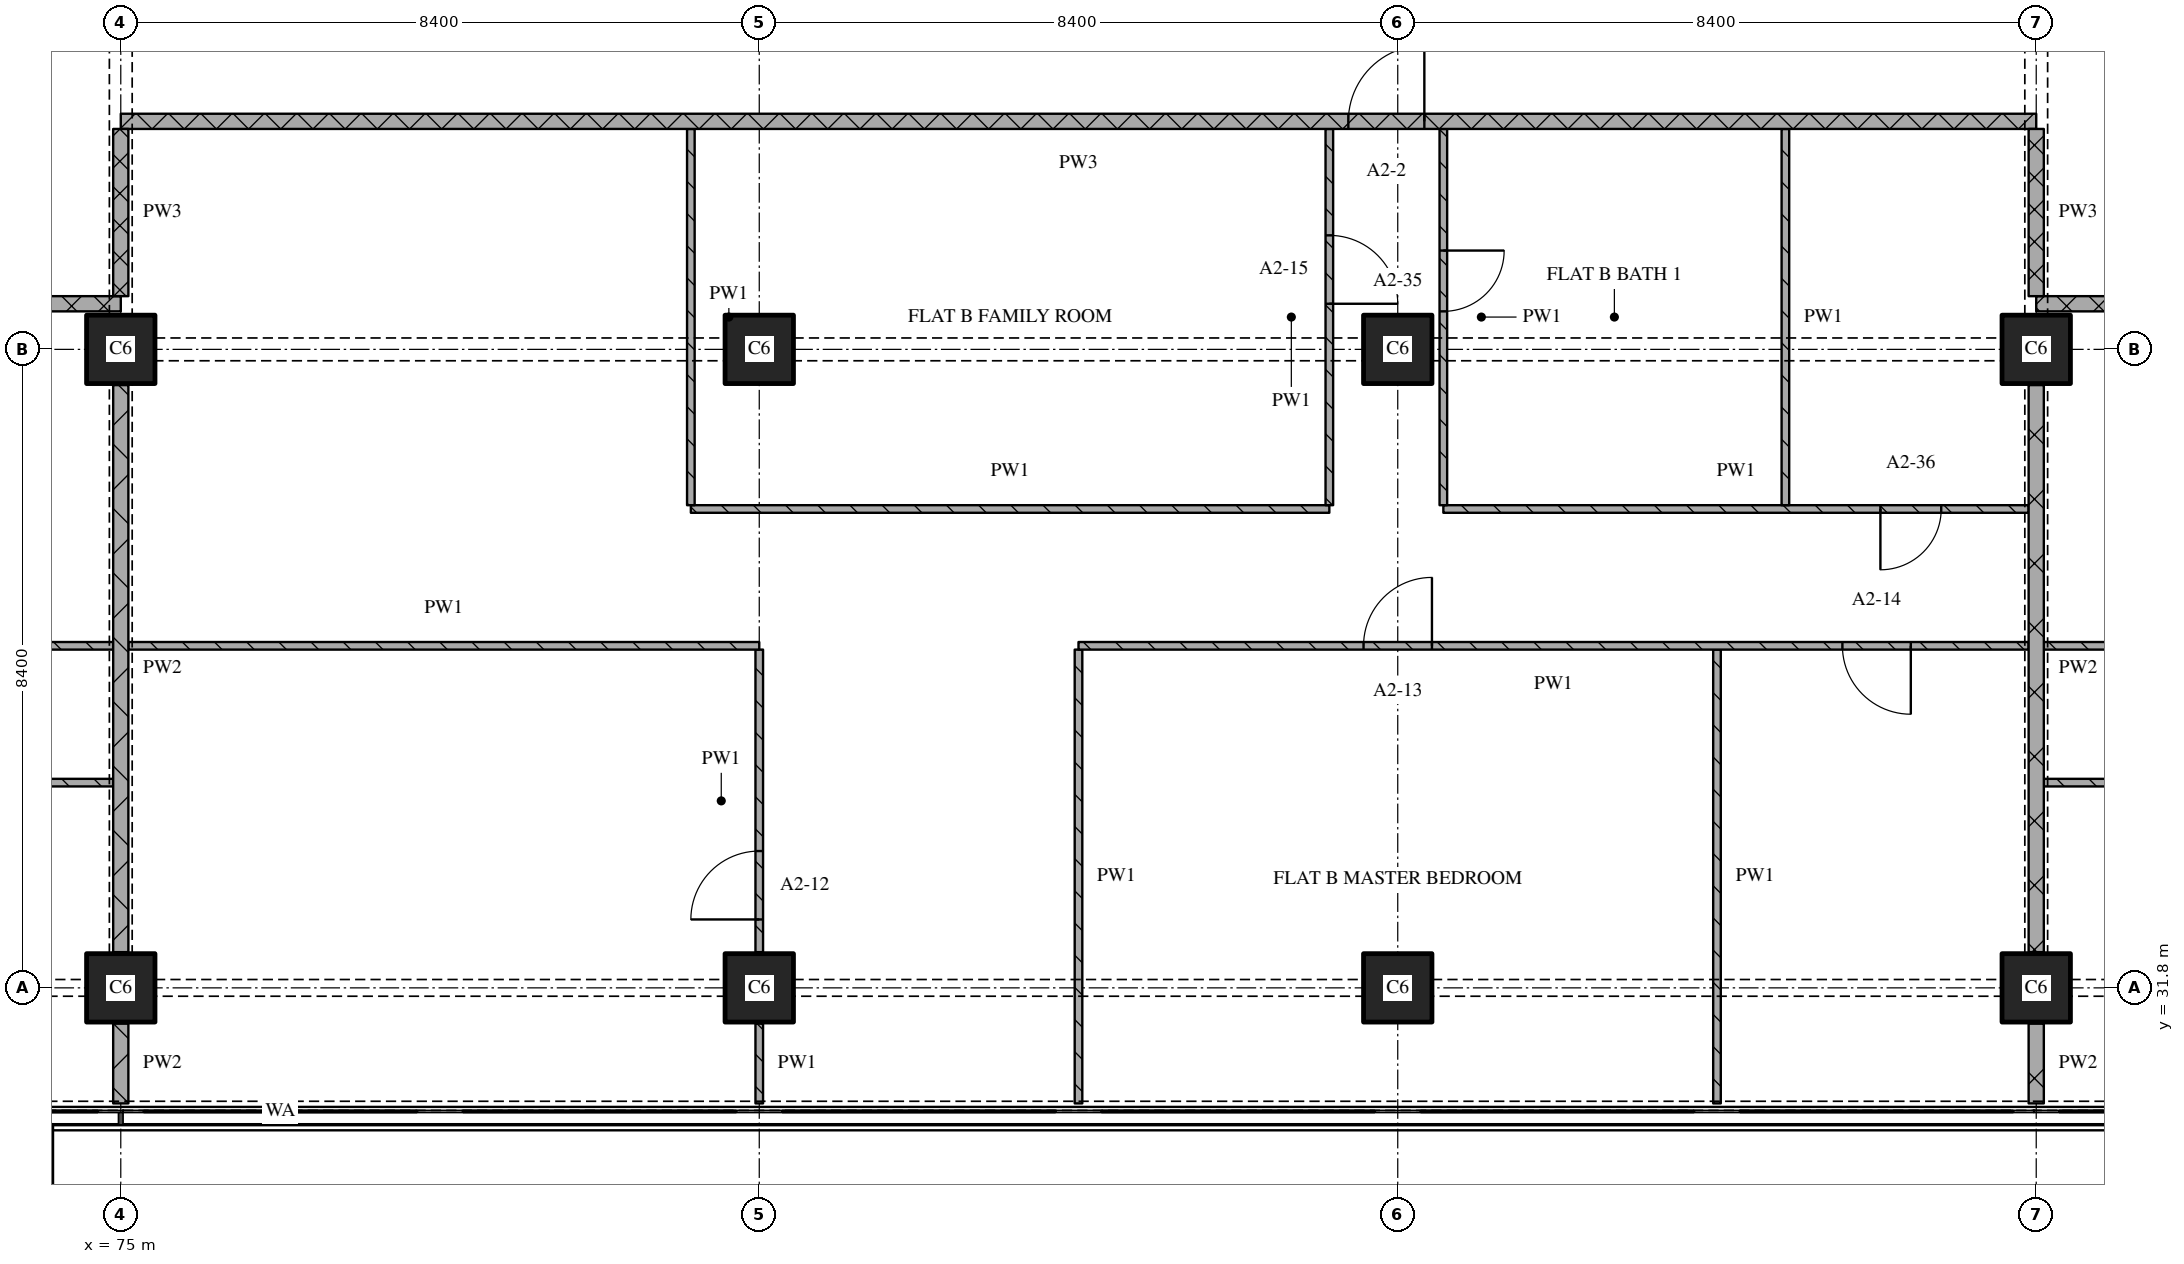
"""IFC4 building model, lengths in metres.
Left out: names, types, materials, properties, quantities, classifications, styles, units other than length and angle.
Written with IfcOpenShell. Run it as: python <this file> out.ifc"""

import sys

from ifc_helpers import new_model, si_unit, direction, frame, frame_2d, origin, origin_2d, place, context, subcontext, project, spatial, rectangle, extrude, element, fill, save


model = new_model("IFC4")
c1 = context("Model", 3, precision=1e-05, world=origin(), true_north=direction((0.0, 1.0)))
c2 = subcontext(c1, "Body", "Model", "MODEL_VIEW")
j1 = project(units=[si_unit("LENGTHUNIT", "METRE"), si_unit("PLANEANGLEUNIT", "RADIAN")], contexts=[c1])
p1 = place(None, origin())
s1 = spatial("IfcSite", under=j1, at=p1, CompositionType="ELEMENT")
p2 = place(p1, origin())
s2 = spatial("IfcBuilding", under=s1, at=p2, CompositionType="ELEMENT")
p3 = place(p2, frame((0.0, 0.0, 48.0)))
s3 = spatial("IfcBuildingStorey", under=s2, at=p3, CompositionType="ELEMENT", Elevation=48.0)
for number, where, z_axis, x_axis in (
    (1, (75.0, 31.8, 0.0), (0.0, 0.0, 1.0), (1.0, 0.0, 0.0)),
    (2, (75.0, 40.2, 0.0), (0.0, 0.0, 1.0), (1.0, 0.0, 0.0)),
    (3, (83.4, 31.8, 0.0), (0.0, 0.0, 1.0), (1.0, 0.0, 0.0)),
    (4, (83.4, 40.2, 0.0), (0.0, 0.0, 1.0), (1.0, 0.0, 0.0)),
    (5, (91.8, 31.8, 0.0), (0.0, 0.0, 1.0), (1.0, 0.0, 0.0)),
    (6, (91.8, 40.2, 0.0), (0.0, 0.0, 1.0), (1.0, 0.0, 0.0)),
    (7, (100.2, 31.8, 0.0), (0.0, 0.0, 1.0), (1.0, 0.0, 0.0)),
    (8, (100.2, 40.2, 0.0), (0.0, 0.0, 1.0), (1.0, 0.0, 0.0)),
):
    element("IfcColumn", number, at=place(p3, frame(where, z_axis=z_axis, x_axis=x_axis)), inside=s3, PredefinedType="COLUMN", context=c2, shape_type="SweptSolid", body=[
        extrude(rectangle(XDim=0.9, YDim=0.9, at=origin_2d()), origin(), (0.0, 0.0, 1.0), 3.6),
    ])
p4 = place(p3, frame((74.9, 34.5, 0.0), z_axis=(0.0, 0.0, 1.0), x_axis=(-1.0, 0.0, 0.0)))
e9 = element("IfcWall", 9, at=p4, inside=s3, PredefinedType="PARTITIONING", context=c2, shape_type="SweptSolid", body=[
    extrude(rectangle(XDim=16.7, YDim=0.1, at=frame_2d((8.35, 0.0))), origin(), (0.0, 0.0, 1.0), 3.32),
])
p5 = place(p4, frame((3.65, 0.0, 0.0)))
e10 = element("IfcOpeningElement", 10, at=p5, cuts=e9, PredefinedType="OPENING", context=c2, shape_type="SweptSolid", body=[
    extrude(rectangle(XDim=0.9, YDim=2.1, at=frame_2d((0.45, 1.05))), frame((0.0, 0.06, 0.0), z_axis=(0.0, -1.0, 0.0), x_axis=(1.0, 0.0, 0.0)), (0.0, 0.0, 1.0), 0.12),
])
p6 = place(p4, frame((12.05, 0.0, 0.0)))
e11 = element("IfcOpeningElement", 11, at=p6, cuts=e9, PredefinedType="OPENING", context=c2, shape_type="SweptSolid", body=[
    extrude(rectangle(XDim=0.9, YDim=2.1, at=frame_2d((0.45, 1.05))), frame((0.0, 0.06, 0.0), z_axis=(0.0, -1.0, 0.0), x_axis=(1.0, 0.0, 0.0)), (0.0, 0.0, 1.0), 0.12),
])
p7 = place(p3, frame((117.0, 34.5, 0.0), z_axis=(0.0, 0.0, 1.0), x_axis=(-1.0, 0.0, 0.0)))
e12 = element("IfcWall", 12, at=p7, inside=s3, PredefinedType="PARTITIONING", context=c2, shape_type="SweptSolid", body=[
    extrude(rectangle(XDim=16.7, YDim=0.1, at=frame_2d((8.35, 0.0))), origin(), (0.0, 0.0, 1.0), 3.32),
])
p8 = place(p7, frame((7.95, 0.0, 0.0)))
e13 = element("IfcOpeningElement", 13, at=p8, cuts=e12, PredefinedType="OPENING", context=c2, shape_type="SweptSolid", body=[
    extrude(rectangle(XDim=0.9, YDim=2.1, at=frame_2d((0.45, 1.05))), frame((0.0, 0.06, 0.0), z_axis=(0.0, -1.0, 0.0), x_axis=(1.0, 0.0, 0.0)), (0.0, 0.0, 1.0), 0.12),
])
p9 = place(p7, frame((14.25, 0.0, 0.0)))
e14 = element("IfcOpeningElement", 14, at=p9, cuts=e12, PredefinedType="OPENING", context=c2, shape_type="SweptSolid", body=[
    extrude(rectangle(XDim=0.9, YDim=2.1, at=frame_2d((0.45, 1.05))), frame((0.0, 0.06, 0.0), z_axis=(0.0, -1.0, 0.0), x_axis=(1.0, 0.0, 0.0)), (0.0, 0.0, 1.0), 0.12),
])
p10 = place(p3, frame((82.5, 38.1, 0.0), z_axis=(0.0, 0.0, 1.0), x_axis=(1.0, 0.0, 0.0)))
e15 = element("IfcWall", 15, at=p10, inside=s3, PredefinedType="PARTITIONING", context=c2, shape_type="SweptSolid", body=[
    extrude(rectangle(XDim=8.4, YDim=0.1, at=frame_2d((4.2, 0.0))), origin(), (0.0, 0.0, 1.0), 3.32),
])
p11 = place(p3, frame((92.4, 38.1, 0.0), z_axis=(0.0, 0.0, 1.0), x_axis=(1.0, 0.0, 0.0)))
e16 = element("IfcWall", 16, at=p11, inside=s3, PredefinedType="PARTITIONING", context=c2, shape_type="SweptSolid", body=[
    extrude(rectangle(XDim=7.7, YDim=0.1, at=frame_2d((3.85, 0.0))), origin(), (0.0, 0.0, 1.0), 3.32),
])
p12 = place(p11, frame((5.75, 0.0, 0.0)))
e17 = element("IfcOpeningElement", 17, at=p12, cuts=e16, PredefinedType="OPENING", context=c2, shape_type="SweptSolid", body=[
    extrude(rectangle(XDim=0.8, YDim=2.1, at=frame_2d((0.4, 1.05))), frame((0.0, 0.06, 0.0), z_axis=(0.0, -1.0, 0.0), x_axis=(1.0, 0.0, 0.0)), (0.0, 0.0, 1.0), 0.12),
])
p13 = place(p3, frame((75.0, 40.8, 0.0), z_axis=(0.0, 0.0, 1.0), x_axis=(-1.0, 0.0, 0.0)))
e18 = element("IfcWall", 18, at=p13, inside=s3, PredefinedType="PARTITIONING", context=c2, shape_type="SweptSolid", body=[
    extrude(rectangle(XDim=24.08, YDim=0.2, at=frame_2d((12.04, 0.0))), origin(), (0.0, 0.0, 1.0), 3.32),
])
p14 = place(p13, frame((8.95, 0.0, 0.0)))
e19 = element("IfcOpeningElement", 19, at=p14, cuts=e18, PredefinedType="OPENING", context=c2, shape_type="SweptSolid", body=[
    extrude(rectangle(XDim=1.0, YDim=2.1, at=frame_2d((0.5, 1.05))), frame((0.0, 0.11, 0.0), z_axis=(0.0, -1.0, 0.0), x_axis=(1.0, 0.0, 0.0)), (0.0, 0.0, 1.0), 0.22),
])
p15 = place(p3, frame((124.28, 40.8, 0.0), z_axis=(0.0, 0.0, 1.0), x_axis=(-1.0, 0.0, 0.0)))
e20 = element("IfcWall", 20, at=p15, inside=s3, PredefinedType="PARTITIONING", context=c2, shape_type="SweptSolid", body=[
    extrude(rectangle(XDim=24.08, YDim=0.2, at=frame_2d((12.04, 0.0))), origin(), (0.0, 0.0, 1.0), 3.32),
])
p16 = place(p15, frame((12.93, 0.0, 0.0)))
e21 = element("IfcOpeningElement", 21, at=p16, cuts=e20, PredefinedType="OPENING", context=c2, shape_type="SweptSolid", body=[
    extrude(rectangle(XDim=1.0, YDim=2.1, at=frame_2d((0.5, 1.05))), frame((0.0, 0.11, 0.0), z_axis=(0.0, -1.0, 0.0), x_axis=(1.0, 0.0, 0.0)), (0.0, 0.0, 1.0), 0.22),
])
p17 = place(p3, frame((100.2, 43.2, 0.0), z_axis=(0.0, 0.0, 1.0), x_axis=(-1.0, 0.0, 0.0)))
e22 = element("IfcWall", 22, at=p17, inside=s3, PredefinedType="PARTITIONING", context=c2, shape_type="SweptSolid", body=[
    extrude(rectangle(XDim=25.2, YDim=0.2, at=frame_2d((12.6, 0.0))), origin(), (0.0, 0.0, 1.0), 3.32),
])
p18 = place(p17, frame((8.05, 0.0, 0.0)))
e23 = element("IfcOpeningElement", 23, at=p18, cuts=e22, PredefinedType="OPENING", context=c2, shape_type="SweptSolid", body=[
    extrude(rectangle(XDim=1.0, YDim=2.1, at=frame_2d((0.5, 1.05))), frame((0.0, 0.11, 0.0), z_axis=(0.0, -1.0, 0.0), x_axis=(1.0, 0.0, 0.0)), (0.0, 0.0, 1.0), 0.22),
])
p19 = place(p3, frame((75.0, 43.1, 0.0), z_axis=(0.0, 0.0, 1.0), x_axis=(0.0, -1.0, 0.0)))
e24 = element("IfcWall", 24, at=p19, inside=s3, PredefinedType="PARTITIONING", context=c2, shape_type="SweptSolid", body=[
    extrude(rectangle(XDim=2.2, YDim=0.2, at=frame_2d((1.1, 0.0))), origin(), (0.0, 0.0, 1.0), 2.43),
])
p20 = place(p3, frame((75.0, 31.33, 0.0), z_axis=(0.0, 0.0, 1.0), x_axis=(0.0, -1.0, 0.0)))
e25 = element("IfcWall", 25, at=p20, inside=s3, PredefinedType="PARTITIONING", context=c2, shape_type="SweptSolid", body=[
    extrude(rectangle(XDim=1.05, YDim=0.2, at=frame_2d((0.525, 0.0))), origin(), (0.0, 0.0, 1.0), 3.32),
])
p21 = place(p3, frame((75.0, 39.73, 0.0), z_axis=(0.0, 0.0, 1.0), x_axis=(0.0, -1.0, 0.0)))
e26 = element("IfcWall", 26, at=p21, inside=s3, PredefinedType="PARTITIONING", context=c2, shape_type="SweptSolid", body=[
    extrude(rectangle(XDim=7.46, YDim=0.2, at=frame_2d((3.73, 0.0))), origin(), (0.0, 0.0, 1.0), 2.83),
])
p22 = place(p3, frame((82.5, 43.1, 0.0), z_axis=(0.0, 0.0, 1.0), x_axis=(0.0, -1.0, 0.0)))
e27 = element("IfcWall", 27, at=p22, inside=s3, PredefinedType="PARTITIONING", context=c2, shape_type="SweptSolid", body=[
    extrude(rectangle(XDim=4.95, YDim=0.1, at=frame_2d((2.475, 0.0))), origin(), (0.0, 0.0, 1.0), 3.32),
])
p23 = place(p3, frame((83.4, 31.33, 0.0), z_axis=(0.0, 0.0, 1.0), x_axis=(0.0, -1.0, 0.0)))
e28 = element("IfcWall", 28, at=p23, inside=s3, PredefinedType="PARTITIONING", context=c2, shape_type="SweptSolid", body=[
    extrude(rectangle(XDim=1.05, YDim=0.1, at=frame_2d((0.525, 0.0))), origin(), (0.0, 0.0, 1.0), 3.32),
])
p24 = place(p3, frame((83.4, 32.27, 0.0), z_axis=(0.0, 0.0, 1.0), x_axis=(0.0, 1.0, 0.0)))
e29 = element("IfcWall", 29, at=p24, inside=s3, PredefinedType="PARTITIONING", context=c2, shape_type="SweptSolid", body=[
    extrude(rectangle(XDim=3.98, YDim=0.1, at=frame_2d((1.99, 0.0))), origin(), (0.0, 0.0, 1.0), 3.32),
])
p25 = place(p24, frame((0.43, 0.0, 0.0)))
e30 = element("IfcOpeningElement", 30, at=p25, cuts=e29, PredefinedType="OPENING", context=c2, shape_type="SweptSolid", body=[
    extrude(rectangle(XDim=0.9, YDim=2.1, at=frame_2d((0.45, 1.05))), frame((0.0, 0.06, 0.0), z_axis=(0.0, -1.0, 0.0), x_axis=(1.0, 0.0, 0.0)), (0.0, 0.0, 1.0), 0.12),
])
p26 = place(p3, frame((87.6, 36.25, 0.0), z_axis=(0.0, 0.0, 1.0), x_axis=(0.0, -1.0, 0.0)))
e31 = element("IfcWall", 31, at=p26, inside=s3, PredefinedType="PARTITIONING", context=c2, shape_type="SweptSolid", body=[
    extrude(rectangle(XDim=5.97, YDim=0.1, at=frame_2d((2.985, 0.0))), origin(), (0.0, 0.0, 1.0), 3.32),
])
p27 = place(p3, frame((90.9, 38.15, 0.0), z_axis=(0.0, 0.0, 1.0), x_axis=(0.0, 1.0, 0.0)))
e32 = element("IfcWall", 32, at=p27, inside=s3, PredefinedType="PARTITIONING", context=c2, shape_type="SweptSolid", body=[
    extrude(rectangle(XDim=4.95, YDim=0.1, at=frame_2d((2.475, 0.0))), origin(), (0.0, 0.0, 1.0), 3.32),
])
p28 = place(p27, frame((2.65, 0.0, 0.0)))
e33 = element("IfcOpeningElement", 33, at=p28, cuts=e32, PredefinedType="OPENING", context=c2, shape_type="SweptSolid", body=[
    extrude(rectangle(XDim=0.9, YDim=2.1, at=frame_2d((0.45, 1.05))), frame((0.0, 0.06, 0.0), z_axis=(0.0, -1.0, 0.0), x_axis=(1.0, 0.0, 0.0)), (0.0, 0.0, 1.0), 0.12),
])
p29 = place(p3, frame((92.4, 43.1, 0.0), z_axis=(0.0, 0.0, 1.0), x_axis=(0.0, -1.0, 0.0)))
e34 = element("IfcWall", 34, at=p29, inside=s3, PredefinedType="PARTITIONING", context=c2, shape_type="SweptSolid", body=[
    extrude(rectangle(XDim=4.95, YDim=0.1, at=frame_2d((2.475, 0.0))), origin(), (0.0, 0.0, 1.0), 3.32),
])
p30 = place(p29, frame((1.6, 0.0, 0.0)))
e35 = element("IfcOpeningElement", 35, at=p30, cuts=e34, PredefinedType="OPENING", context=c2, shape_type="SweptSolid", body=[
    extrude(rectangle(XDim=0.8, YDim=2.1, at=frame_2d((0.4, 1.05))), frame((0.0, 0.06, 0.0), z_axis=(0.0, -1.0, 0.0), x_axis=(1.0, 0.0, 0.0)), (0.0, 0.0, 1.0), 0.12),
])
p31 = place(p3, frame((96.0, 36.25, 0.0), z_axis=(0.0, 0.0, 1.0), x_axis=(0.0, -1.0, 0.0)))
e36 = element("IfcWall", 36, at=p31, inside=s3, PredefinedType="PARTITIONING", context=c2, shape_type="SweptSolid", body=[
    extrude(rectangle(XDim=5.97, YDim=0.1, at=frame_2d((2.985, 0.0))), origin(), (0.0, 0.0, 1.0), 3.32),
])
p32 = place(p3, frame((96.9, 43.1, 0.0), z_axis=(0.0, 0.0, 1.0), x_axis=(0.0, -1.0, 0.0)))
e37 = element("IfcWall", 37, at=p32, inside=s3, PredefinedType="PARTITIONING", context=c2, shape_type="SweptSolid", body=[
    extrude(rectangle(XDim=4.95, YDim=0.1, at=frame_2d((2.475, 0.0))), origin(), (0.0, 0.0, 1.0), 3.32),
])
p33 = place(p3, frame((100.2, 43.1, 0.0), z_axis=(0.0, 0.0, 1.0), x_axis=(0.0, -1.0, 0.0)))
e38 = element("IfcWall", 38, at=p33, inside=s3, PredefinedType="PARTITIONING", context=c2, shape_type="SweptSolid", body=[
    extrude(rectangle(XDim=2.2, YDim=0.2, at=frame_2d((1.1, 0.0))), origin(), (0.0, 0.0, 1.0), 2.43),
])
p34 = place(p3, frame((100.2, 31.33, 0.0), z_axis=(0.0, 0.0, 1.0), x_axis=(0.0, -1.0, 0.0)))
e39 = element("IfcWall", 39, at=p34, inside=s3, PredefinedType="PARTITIONING", context=c2, shape_type="SweptSolid", body=[
    extrude(rectangle(XDim=1.05, YDim=0.2, at=frame_2d((0.525, 0.0))), origin(), (0.0, 0.0, 1.0), 3.32),
])
p35 = place(p3, frame((100.2, 39.73, 0.0), z_axis=(0.0, 0.0, 1.0), x_axis=(0.0, -1.0, 0.0)))
e40 = element("IfcWall", 40, at=p35, inside=s3, PredefinedType="PARTITIONING", context=c2, shape_type="SweptSolid", body=[
    extrude(rectangle(XDim=7.46, YDim=0.2, at=frame_2d((3.73, 0.0))), origin(), (0.0, 0.0, 1.0), 2.83),
])
p36 = place(p3, frame((66.3, 36.3, 0.0), z_axis=(0.0, 0.0, 1.0), x_axis=(1.0, 0.0, 0.0)))
e41 = element("IfcWall", 41, at=p36, inside=s3, PredefinedType="PARTITIONING", context=c2, shape_type="SweptSolid", body=[
    extrude(rectangle(XDim=8.6, YDim=0.1, at=frame_2d((4.3, 0.0))), origin(), (0.0, 0.0, 1.0), 3.32),
])
p37 = place(p36, frame((6.2, 0.0, 0.0)))
e42 = element("IfcOpeningElement", 42, at=p37, cuts=e41, PredefinedType="OPENING", context=c2, shape_type="SweptSolid", body=[
    extrude(rectangle(XDim=0.8, YDim=2.1, at=frame_2d((0.4, 1.05))), frame((0.0, 0.06, 0.0), z_axis=(0.0, -1.0, 0.0), x_axis=(1.0, 0.0, 0.0)), (0.0, 0.0, 1.0), 0.12),
])
p38 = place(p3, frame((75.1, 36.3, 0.0), z_axis=(0.0, 0.0, 1.0), x_axis=(1.0, 0.0, 0.0)))
e43 = element("IfcWall", 43, at=p38, inside=s3, PredefinedType="PARTITIONING", context=c2, shape_type="SweptSolid", body=[
    extrude(rectangle(XDim=8.3, YDim=0.1, at=frame_2d((4.15, 0.0))), origin(), (0.0, 0.0, 1.0), 3.32),
])
p39 = place(p3, frame((100.1, 36.3, 0.0), z_axis=(0.0, 0.0, 1.0), x_axis=(-1.0, 0.0, 0.0)))
e44 = element("IfcWall", 44, at=p39, inside=s3, PredefinedType="PARTITIONING", context=c2, shape_type="SweptSolid", body=[
    extrude(rectangle(XDim=12.5, YDim=0.1, at=frame_2d((6.25, 0.0))), origin(), (0.0, 0.0, 1.0), 3.32),
])
p40 = place(p39, frame((1.55, 0.0, 0.0)))
e45 = element("IfcOpeningElement", 45, at=p40, cuts=e44, PredefinedType="OPENING", context=c2, shape_type="SweptSolid", body=[
    extrude(rectangle(XDim=0.9, YDim=2.1, at=frame_2d((0.45, 1.05))), frame((0.0, 0.06, 0.0), z_axis=(0.0, -1.0, 0.0), x_axis=(1.0, 0.0, 0.0)), (0.0, 0.0, 1.0), 0.12),
])
p41 = place(p39, frame((7.85, 0.0, 0.0)))
e46 = element("IfcOpeningElement", 46, at=p41, cuts=e44, PredefinedType="OPENING", context=c2, shape_type="SweptSolid", body=[
    extrude(rectangle(XDim=0.9, YDim=2.1, at=frame_2d((0.45, 1.05))), frame((0.0, 0.06, 0.0), z_axis=(0.0, -1.0, 0.0), x_axis=(1.0, 0.0, 0.0)), (0.0, 0.0, 1.0), 0.12),
])
p42 = place(p3, frame((100.3, 36.3, 0.0), z_axis=(0.0, 0.0, 1.0), x_axis=(1.0, 0.0, 0.0)))
e47 = element("IfcWall", 47, at=p42, inside=s3, PredefinedType="PARTITIONING", context=c2, shape_type="SweptSolid", body=[
    extrude(rectangle(XDim=9.8, YDim=0.1, at=frame_2d((4.9, 0.0))), origin(), (0.0, 0.0, 1.0), 3.32),
])
p43 = place(p42, frame((1.75, 0.0, 0.0)))
e48 = element("IfcOpeningElement", 48, at=p43, cuts=e47, PredefinedType="OPENING", context=c2, shape_type="SweptSolid", body=[
    extrude(rectangle(XDim=0.8, YDim=2.1, at=frame_2d((0.4, 1.05))), frame((0.0, 0.06, 0.0), z_axis=(0.0, -1.0, 0.0), x_axis=(1.0, 0.0, 0.0)), (0.0, 0.0, 1.0), 0.12),
])
p44 = place(p12, origin())
e49 = element("IfcDoor", 49, at=p44, inside=s3, OperationType="SINGLE_SWING_RIGHT", PredefinedType="DOOR", context=c2, shape_type="SweptSolid", body=[
    extrude(rectangle(XDim=0.8, YDim=2.1, at=frame_2d((0.4, 1.05))), frame((0.0, 0.025, 0.0), z_axis=(0.0, -1.0, 0.0), x_axis=(1.0, 0.0, 0.0)), (0.0, 0.0, 1.0), 0.05),
])
fill(e17, e49)
p45 = place(p18, origin())
e50 = element("IfcDoor", 50, at=p45, inside=s3, OperationType="SINGLE_SWING_RIGHT", PredefinedType="DOOR", context=c2, shape_type="SweptSolid", body=[
    extrude(rectangle(XDim=1.0, YDim=2.1, at=frame_2d((0.5, 1.05))), frame((0.0, 0.025, 0.0), z_axis=(0.0, -1.0, 0.0), x_axis=(1.0, 0.0, 0.0)), (0.0, 0.0, 1.0), 0.05),
])
fill(e23, e50)
p46 = place(p25, origin())
e51 = element("IfcDoor", 51, at=p46, inside=s3, OperationType="SINGLE_SWING_LEFT", PredefinedType="DOOR", context=c2, shape_type="SweptSolid", body=[
    extrude(rectangle(XDim=0.9, YDim=2.1, at=frame_2d((0.45, 1.05))), frame((0.0, 0.025, 0.0), z_axis=(0.0, -1.0, 0.0), x_axis=(1.0, 0.0, 0.0)), (0.0, 0.0, 1.0), 0.05),
])
fill(e30, e51)
p47 = place(p28, origin())
e52 = element("IfcDoor", 52, at=p47, inside=s3, OperationType="SINGLE_SWING_RIGHT", PredefinedType="DOOR", context=c2, shape_type="SweptSolid", body=[
    extrude(rectangle(XDim=0.9, YDim=2.1, at=frame_2d((0.45, 1.05))), frame((0.0, 0.025, 0.0), z_axis=(0.0, -1.0, 0.0), x_axis=(1.0, 0.0, 0.0)), (0.0, 0.0, 1.0), 0.05),
])
fill(e33, e52)
p48 = place(p30, origin())
e53 = element("IfcDoor", 53, at=p48, inside=s3, OperationType="SINGLE_SWING_LEFT", PredefinedType="DOOR", context=c2, shape_type="SweptSolid", body=[
    extrude(rectangle(XDim=0.8, YDim=2.1, at=frame_2d((0.4, 1.05))), frame((0.0, 0.025, 0.0), z_axis=(0.0, -1.0, 0.0), x_axis=(1.0, 0.0, 0.0)), (0.0, 0.0, 1.0), 0.05),
])
fill(e35, e53)
p49 = place(p40, origin())
e54 = element("IfcDoor", 54, at=p49, inside=s3, OperationType="SINGLE_SWING_LEFT", PredefinedType="DOOR", context=c2, shape_type="SweptSolid", body=[
    extrude(rectangle(XDim=0.9, YDim=2.1, at=frame_2d((0.45, 1.05))), frame((0.0, 0.025, 0.0), z_axis=(0.0, -1.0, 0.0), x_axis=(1.0, 0.0, 0.0)), (0.0, 0.0, 1.0), 0.05),
])
fill(e45, e54)
p50 = place(p41, origin())
e55 = element("IfcDoor", 55, at=p50, inside=s3, OperationType="SINGLE_SWING_RIGHT", PredefinedType="DOOR", context=c2, shape_type="SweptSolid", body=[
    extrude(rectangle(XDim=0.9, YDim=2.1, at=frame_2d((0.45, 1.05))), frame((0.0, 0.025, 0.0), z_axis=(0.0, -1.0, 0.0), x_axis=(1.0, 0.0, 0.0)), (0.0, 0.0, 1.0), 0.05),
])
fill(e46, e55)
save(model, sys.argv[1])
